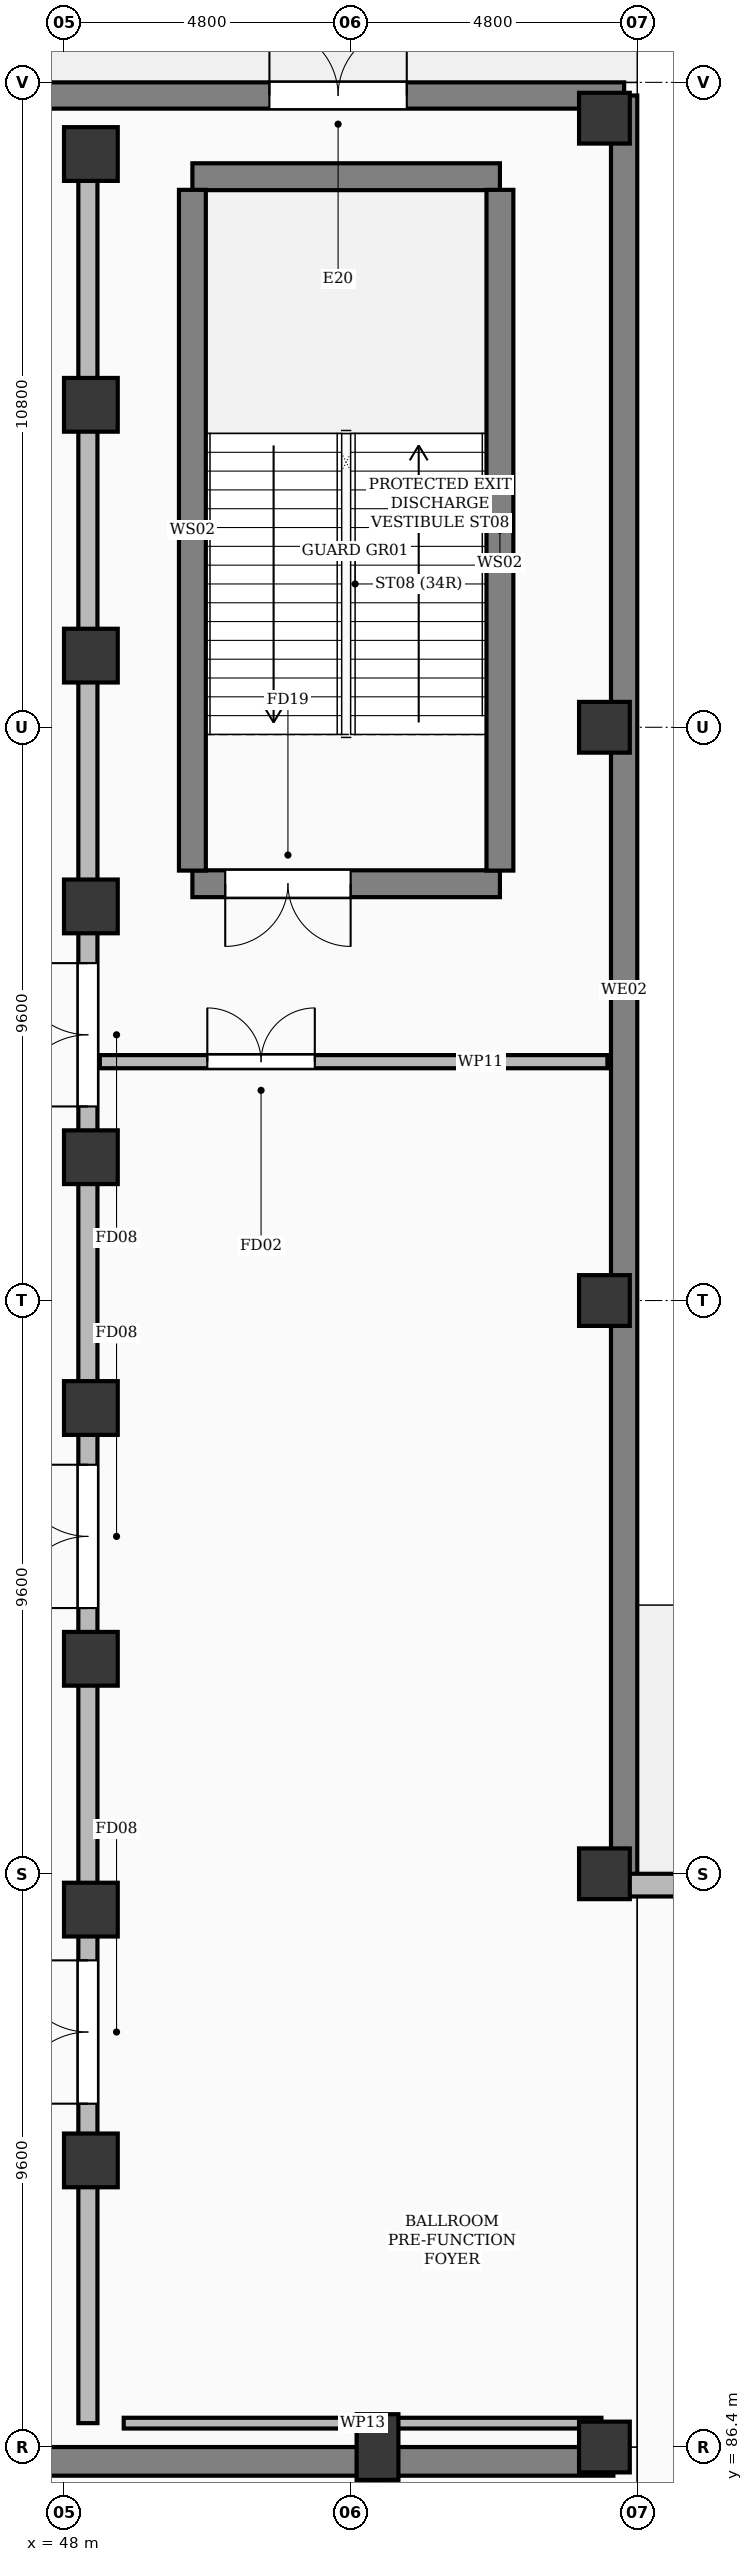
"""IFC4 building model, lengths in metres.
Left out: names, types, materials, properties, quantities, classifications, styles, units other than length and angle.
Written with IfcOpenShell. Run it as: python <this file> out.ifc"""

import sys

from ifc_helpers import new_model, si_unit, direction, frame, frame_2d, origin, origin_2d, place, context, subcontext, project, spatial, rectangle, extrude, element, fill, save


model = new_model("IFC4")
c1 = context("Model", 3, precision=1e-05, world=origin(), true_north=direction((0.0, 1.0)))
c2 = subcontext(c1, "Body", "Model", "MODEL_VIEW")
j1 = project(units=[si_unit("LENGTHUNIT", "METRE"), si_unit("PLANEANGLEUNIT", "RADIAN")], contexts=[c1])
p1 = place(None, origin())
s1 = spatial("IfcSite", under=j1, at=p1, CompositionType="ELEMENT")
p2 = place(p1, origin())
s2 = spatial("IfcBuilding", under=s1, at=p2, CompositionType="ELEMENT")
p3 = place(p2, origin())
s3 = spatial("IfcBuildingStorey", under=s2, at=p3, CompositionType="ELEMENT", Elevation=0.0)
p4 = place(p3, frame((57.05, 86.4, 0.0), z_axis=(0.0, 0.0, 1.0), x_axis=(1.0, 0.0, 0.0)))
e1 = element("IfcColumn", 1, at=p4, inside=s3, PredefinedType="COLUMN", context=c2, shape_type="SweptSolid", body=[
    extrude(rectangle(XDim=0.85, YDim=0.85, at=origin_2d()), origin(), (0.0, 0.0, 1.0), 6.0),
])
p5 = place(p3, frame((53.25, 86.4, 0.0), z_axis=(0.0, 0.0, 1.0), x_axis=(1.0, 0.0, 0.0)))
e2 = element("IfcColumn", 2, at=p5, inside=s3, PredefinedType="COLUMN", context=c2, shape_type="SweptSolid", body=[
    extrude(rectangle(XDim=0.7, YDim=1.1, at=origin_2d()), origin(), (0.0, 0.0, 1.0), 6.0),
])
for number, where, z_axis, x_axis in (
    (3, (48.45, 91.2, 0.0), (0.0, 0.0, 1.0), (1.0, 0.0, 0.0)),
    (4, (48.45, 95.4, 0.0), (0.0, 0.0, 1.0), (1.0, 0.0, 0.0)),
    (5, (48.45, 99.6, 0.0), (0.0, 0.0, 1.0), (1.0, 0.0, 0.0)),
    (6, (48.45, 103.8, 0.0), (0.0, 0.0, 1.0), (1.0, 0.0, 0.0)),
    (7, (48.45, 108.0, 0.0), (0.0, 0.0, 1.0), (1.0, 0.0, 0.0)),
    (8, (48.45, 112.2, 0.0), (0.0, 0.0, 1.0), (1.0, 0.0, 0.0)),
    (9, (48.45, 116.4, 0.0), (0.0, 0.0, 1.0), (1.0, 0.0, 0.0)),
    (10, (48.45, 120.6, 0.0), (0.0, 0.0, 1.0), (1.0, 0.0, 0.0)),
    (11, (48.45, 124.8, 0.0), (0.0, 0.0, 1.0), (1.0, 0.0, 0.0)),
):
    element("IfcColumn", number, at=place(p3, frame(where, z_axis=z_axis, x_axis=x_axis)), inside=s3, PredefinedType="COLUMN", context=c2, shape_type="SweptSolid", body=[
        extrude(rectangle(XDim=0.9, YDim=0.9, at=origin_2d()), origin(), (0.0, 0.0, 1.0), 6.0),
    ])
for number, where, z_axis, x_axis in (
    (12, (57.05, 96.0, 0.0), (0.0, 0.0, 1.0), (1.0, 0.0, 0.0)),
    (13, (57.05, 105.6, 0.0), (0.0, 0.0, 1.0), (1.0, 0.0, 0.0)),
    (14, (57.05, 115.2, 0.0), (0.0, 0.0, 1.0), (1.0, 0.0, 0.0)),
    (15, (57.05, 125.4, 0.0), (0.0, 0.0, 1.0), (1.0, 0.0, 0.0)),
):
    element("IfcColumn", number, at=place(p3, frame(where, z_axis=z_axis, x_axis=x_axis)), inside=s3, PredefinedType="COLUMN", context=c2, shape_type="SweptSolid", body=[
        extrude(rectangle(XDim=0.85, YDim=0.85, at=origin_2d()), origin(), (0.0, 0.0, 1.0), 6.0),
    ])
p6 = place(p3, frame((0.24, 125.78, 0.0), z_axis=(0.0, 0.0, 1.0), x_axis=(1.0, 0.0, 0.0)))
e16 = element("IfcWall", 16, at=p6, inside=s3, PredefinedType="SOLIDWALL", context=c2, shape_type="SweptSolid", body=[
    extrude(rectangle(XDim=57.14, YDim=0.44, at=frame_2d((28.57, 0.0))), origin(), (0.0, 0.0, 1.0), 6.0),
])
p7 = place(p6, frame((4.95, 0.0, 0.0)))
e17 = element("IfcOpeningElement", 17, at=p7, cuts=e16, PredefinedType="OPENING", context=c2, shape_type="SweptSolid", body=[
    extrude(rectangle(XDim=2.3, YDim=2.4, at=frame_2d((1.15, 1.2))), frame((0.0, 0.232, 0.0), z_axis=(0.0, -1.0, 0.0), x_axis=(1.0, 0.0, 0.0)), (0.0, 0.0, 1.0), 0.464),
])
p8 = place(p6, frame((8.0, 0.0, 0.0)))
e18 = element("IfcOpeningElement", 18, at=p8, cuts=e16, PredefinedType="OPENING", context=c2, shape_type="SweptSolid", body=[
    extrude(rectangle(XDim=2.3, YDim=2.4, at=frame_2d((1.15, 1.2))), frame((0.0, 0.232, 0.0), z_axis=(0.0, -1.0, 0.0), x_axis=(1.0, 0.0, 0.0)), (0.0, 0.0, 1.0), 0.464),
])
p9 = place(p6, frame((12.8, 0.0, 0.0)))
e19 = element("IfcOpeningElement", 19, at=p9, cuts=e16, PredefinedType="OPENING", context=c2, shape_type="SweptSolid", body=[
    extrude(rectangle(XDim=2.3, YDim=2.4, at=frame_2d((1.15, 1.2))), frame((0.0, 0.232, 0.0), z_axis=(0.0, -1.0, 0.0), x_axis=(1.0, 0.0, 0.0)), (0.0, 0.0, 1.0), 0.464),
])
p10 = place(p6, frame((17.6, 0.0, 0.0)))
e20 = element("IfcOpeningElement", 20, at=p10, cuts=e16, PredefinedType="OPENING", context=c2, shape_type="SweptSolid", body=[
    extrude(rectangle(XDim=2.3, YDim=2.4, at=frame_2d((1.15, 1.2))), frame((0.0, 0.232, 0.0), z_axis=(0.0, -1.0, 0.0), x_axis=(1.0, 0.0, 0.0)), (0.0, 0.0, 1.0), 0.464),
])
p11 = place(p6, frame((22.4, 0.0, 0.0)))
e21 = element("IfcOpeningElement", 21, at=p11, cuts=e16, PredefinedType="OPENING", context=c2, shape_type="SweptSolid", body=[
    extrude(rectangle(XDim=2.3, YDim=2.4, at=frame_2d((1.15, 1.2))), frame((0.0, 0.232, 0.0), z_axis=(0.0, -1.0, 0.0), x_axis=(1.0, 0.0, 0.0)), (0.0, 0.0, 1.0), 0.464),
])
p12 = place(p6, frame((27.2, 0.0, 0.0)))
e22 = element("IfcOpeningElement", 22, at=p12, cuts=e16, PredefinedType="OPENING", context=c2, shape_type="SweptSolid", body=[
    extrude(rectangle(XDim=2.3, YDim=2.4, at=frame_2d((1.15, 1.2))), frame((0.0, 0.232, 0.0), z_axis=(0.0, -1.0, 0.0), x_axis=(1.0, 0.0, 0.0)), (0.0, 0.0, 1.0), 0.464),
])
p13 = place(p6, frame((32.0, 0.0, 0.0)))
e23 = element("IfcOpeningElement", 23, at=p13, cuts=e16, PredefinedType="OPENING", context=c2, shape_type="SweptSolid", body=[
    extrude(rectangle(XDim=2.3, YDim=2.4, at=frame_2d((1.15, 1.2))), frame((0.0, 0.232, 0.0), z_axis=(0.0, -1.0, 0.0), x_axis=(1.0, 0.0, 0.0)), (0.0, 0.0, 1.0), 0.464),
])
p14 = place(p6, frame((36.8, 0.0, 0.0)))
e24 = element("IfcOpeningElement", 24, at=p14, cuts=e16, PredefinedType="OPENING", context=c2, shape_type="SweptSolid", body=[
    extrude(rectangle(XDim=2.3, YDim=2.4, at=frame_2d((1.15, 1.2))), frame((0.0, 0.232, 0.0), z_axis=(0.0, -1.0, 0.0), x_axis=(1.0, 0.0, 0.0)), (0.0, 0.0, 1.0), 0.464),
])
p15 = place(p6, frame((51.2, 0.0, 0.0)))
e25 = element("IfcOpeningElement", 25, at=p15, cuts=e16, PredefinedType="OPENING", context=c2, shape_type="SweptSolid", body=[
    extrude(rectangle(XDim=2.3, YDim=2.4, at=frame_2d((1.15, 1.2))), frame((0.0, 0.232, 0.0), z_axis=(0.0, -1.0, 0.0), x_axis=(1.0, 0.0, 0.0)), (0.0, 0.0, 1.0), 0.464),
])
p16 = place(p6, frame((43.0, 0.0, 0.0)))
e26 = element("IfcOpeningElement", 26, at=p16, cuts=e16, PredefinedType="OPENING", context=c2, shape_type="SweptSolid", body=[
    extrude(rectangle(XDim=4.2, YDim=4.1, at=frame_2d((2.1, 2.05))), frame((0.0, 0.232, 0.0), z_axis=(0.0, -1.0, 0.0), x_axis=(1.0, 0.0, 0.0)), (0.0, 0.0, 1.0), 0.464),
])
p17 = place(p3, frame((57.38, 125.78, 0.0), z_axis=(0.0, 0.0, 1.0), x_axis=(0.0, -1.0, 0.0)))
e27 = element("IfcWall", 27, at=p17, inside=s3, PredefinedType="SOLIDWALL", context=c2, shape_type="SweptSolid", body=[
    extrude(rectangle(XDim=29.97, YDim=0.44, at=frame_2d((14.985, 0.0))), origin(), (0.0, 0.0, 1.0), 6.0),
])
p18 = place(p3, frame((57.4, 95.81, 0.0), z_axis=(0.0, 0.0, 1.0), x_axis=(1.0, 0.0, 0.0)))
e28 = element("IfcWall", 28, at=p18, inside=s3, PredefinedType="SOLIDWALL", context=c2, shape_type="SweptSolid", body=[
    extrude(rectangle(XDim=9.8, YDim=0.38, at=frame_2d((4.9, 0.0))), origin(), (0.0, 0.0, 1.0), 4.692),
])
p19 = place(p18, frame((1.4, 0.0, 0.0)))
e29 = element("IfcOpeningElement", 29, at=p19, cuts=e28, PredefinedType="OPENING", context=c2, shape_type="SweptSolid", body=[
    extrude(rectangle(XDim=6.0, YDim=3.8, at=frame_2d((3.0, 1.9))), frame((0.0, 0.202, 0.0), z_axis=(0.0, -1.0, 0.0), x_axis=(1.0, 0.0, 0.0)), (0.0, 0.0, 1.0), 0.404),
])
p20 = place(p3, frame((0.5, 86.16, 0.0), z_axis=(0.0, 0.0, 1.0), x_axis=(1.0, 0.0, 0.0)))
e30 = element("IfcWall", 30, at=p20, inside=s3, PredefinedType="SOLIDWALL", context=c2, shape_type="SweptSolid", body=[
    extrude(rectangle(XDim=56.7, YDim=0.48, at=frame_2d((28.35, 0.0))), origin(), (0.0, 0.0, 1.0), 6.0),
])
p21 = place(p3, frame((50.15, 112.58, 0.0), z_axis=(0.0, 0.0, 1.0), x_axis=(1.0, 0.0, 0.0)))
e31 = element("IfcWall", 31, at=p21, inside=s3, PredefinedType="SHEAR", context=c2, shape_type="SweptSolid", body=[
    extrude(rectangle(XDim=5.15, YDim=0.45, at=frame_2d((2.575, 0.0))), origin(), (0.0, 0.0, 1.0), 5.7),
])
p22 = place(p21, frame((0.55, 0.0, 0.0)))
e32 = element("IfcOpeningElement", 32, at=p22, cuts=e31, PredefinedType="OPENING", context=c2, shape_type="SweptSolid", body=[
    extrude(rectangle(XDim=2.1, YDim=2.2, at=frame_2d((1.05, 1.1))), frame((0.0, 0.237, 0.0), z_axis=(0.0, -1.0, 0.0), x_axis=(1.0, 0.0, 0.0)), (0.0, 0.0, 1.0), 0.474),
])
p23 = place(p3, frame((50.15, 124.42, 0.0), z_axis=(0.0, 0.0, 1.0), x_axis=(1.0, 0.0, 0.0)))
e33 = element("IfcWall", 33, at=p23, inside=s3, PredefinedType="SHEAR", context=c2, shape_type="SweptSolid", body=[
    extrude(rectangle(XDim=5.15, YDim=0.45, at=frame_2d((2.575, 0.0))), origin(), (0.0, 0.0, 1.0), 5.7),
])
for number, where, z_axis, x_axis in (
    (34, (50.15, 112.8, 0.0), (0.0, 0.0, 1.0), (0.0, 1.0, 0.0)),
    (35, (55.3, 112.8, 0.0), (0.0, 0.0, 1.0), (0.0, 1.0, 0.0)),
):
    element("IfcWall", number, at=place(p3, frame(where, z_axis=z_axis, x_axis=x_axis)), inside=s3, PredefinedType="SHEAR", context=c2, shape_type="SweptSolid", body=[
        extrude(rectangle(XDim=11.4, YDim=0.45, at=frame_2d((5.7, 0.0))), origin(), (0.0, 0.0, 1.0), 5.7),
    ])
p24 = place(p3, frame((48.4, 86.8, 0.0), z_axis=(0.0, 0.0, 1.0), x_axis=(0.0, 1.0, 0.0)))
e36 = element("IfcWall", 36, at=p24, inside=s3, PredefinedType="SOLIDWALL", context=c2, shape_type="SweptSolid", body=[
    extrude(rectangle(XDim=37.8, YDim=0.32, at=frame_2d((18.9, 0.0))), origin(), (0.0, 0.0, 1.0), 4.692),
])
p25 = place(p24, frame((5.35, 0.0, 0.0)))
e37 = element("IfcOpeningElement", 37, at=p25, cuts=e36, PredefinedType="OPENING", context=c2, shape_type="SweptSolid", body=[
    extrude(rectangle(XDim=2.4, YDim=2.5, at=frame_2d((1.2, 1.25))), frame((0.0, 0.172, 0.0), z_axis=(0.0, -1.0, 0.0), x_axis=(1.0, 0.0, 0.0)), (0.0, 0.0, 1.0), 0.344),
])
p26 = place(p24, frame((13.65, 0.0, 0.0)))
e38 = element("IfcOpeningElement", 38, at=p26, cuts=e36, PredefinedType="OPENING", context=c2, shape_type="SweptSolid", body=[
    extrude(rectangle(XDim=2.4, YDim=2.5, at=frame_2d((1.2, 1.25))), frame((0.0, 0.172, 0.0), z_axis=(0.0, -1.0, 0.0), x_axis=(1.0, 0.0, 0.0)), (0.0, 0.0, 1.0), 0.344),
])
p27 = place(p24, frame((22.05, 0.0, 0.0)))
e39 = element("IfcOpeningElement", 39, at=p27, cuts=e36, PredefinedType="OPENING", context=c2, shape_type="SweptSolid", body=[
    extrude(rectangle(XDim=2.4, YDim=2.5, at=frame_2d((1.2, 1.25))), frame((0.0, 0.172, 0.0), z_axis=(0.0, -1.0, 0.0), x_axis=(1.0, 0.0, 0.0)), (0.0, 0.0, 1.0), 0.344),
])
p28 = place(p3, frame((49.0, 86.8, 0.0), z_axis=(0.0, 0.0, 1.0), x_axis=(1.0, 0.0, 0.0)))
e40 = element("IfcWall", 40, at=p28, inside=s3, PredefinedType="PARTITIONING", context=c2, shape_type="SweptSolid", body=[
    extrude(rectangle(XDim=8.0, YDim=0.18, at=frame_2d((4.0, 0.0))), origin(), (0.0, 0.0, 1.0), 4.592),
])
p29 = place(p3, frame((48.6, 109.6, 0.0), z_axis=(0.0, 0.0, 1.0), x_axis=(1.0, 0.0, 0.0)))
e41 = element("IfcWall", 41, at=p29, inside=s3, PredefinedType="PARTITIONING", context=c2, shape_type="SweptSolid", body=[
    extrude(rectangle(XDim=8.5, YDim=0.22, at=frame_2d((4.25, 0.0))), origin(), (0.0, 0.0, 1.0), 4.692),
])
p30 = place(p29, frame((1.8, 0.0, 0.0)))
e42 = element("IfcOpeningElement", 42, at=p30, cuts=e41, PredefinedType="OPENING", context=c2, shape_type="SweptSolid", body=[
    extrude(rectangle(XDim=1.8, YDim=2.2, at=frame_2d((0.9, 1.1))), frame((0.0, 0.122, 0.0), z_axis=(0.0, -1.0, 0.0), x_axis=(1.0, 0.0, 0.0)), (0.0, 0.0, 1.0), 0.244),
])
p31 = place(p15, origin())
e43 = element("IfcDoor", 43, at=p31, inside=s3, OperationType="DOUBLE_DOOR_SINGLE_SWING", PredefinedType="DOOR", context=c2, shape_type="SweptSolid", body=[
    extrude(rectangle(XDim=2.3, YDim=2.4, at=frame_2d((1.15, 1.2))), frame((0.0, 0.025, 0.0), z_axis=(0.0, -1.0, 0.0), x_axis=(1.0, 0.0, 0.0)), (0.0, 0.0, 1.0), 0.05),
])
fill(e25, e43)
p32 = place(p22, frame((2.1, 0.0, 0.0), z_axis=(0.0, 0.0, 1.0), x_axis=(-1.0, 0.0, 0.0)))
e44 = element("IfcDoor", 44, at=p32, inside=s3, OperationType="DOUBLE_DOOR_SINGLE_SWING", PredefinedType="DOOR", context=c2, shape_type="SweptSolid", body=[
    extrude(rectangle(XDim=2.1, YDim=2.2, at=frame_2d((1.05, 1.1))), frame((0.0, 0.025, 0.0), z_axis=(0.0, -1.0, 0.0), x_axis=(1.0, 0.0, 0.0)), (0.0, 0.0, 1.0), 0.05),
])
fill(e32, e44)
p33 = place(p25, origin())
e45 = element("IfcDoor", 45, at=p33, inside=s3, OperationType="DOUBLE_DOOR_SINGLE_SWING", PredefinedType="DOOR", context=c2, shape_type="SweptSolid", body=[
    extrude(rectangle(XDim=2.4, YDim=2.5, at=frame_2d((1.2, 1.25))), frame((0.0, 0.025, 0.0), z_axis=(0.0, -1.0, 0.0), x_axis=(1.0, 0.0, 0.0)), (0.0, 0.0, 1.0), 0.05),
])
fill(e37, e45)
p34 = place(p26, origin())
e46 = element("IfcDoor", 46, at=p34, inside=s3, OperationType="DOUBLE_DOOR_SINGLE_SWING", PredefinedType="DOOR", context=c2, shape_type="SweptSolid", body=[
    extrude(rectangle(XDim=2.4, YDim=2.5, at=frame_2d((1.2, 1.25))), frame((0.0, 0.025, 0.0), z_axis=(0.0, -1.0, 0.0), x_axis=(1.0, 0.0, 0.0)), (0.0, 0.0, 1.0), 0.05),
])
fill(e38, e46)
p35 = place(p27, origin())
e47 = element("IfcDoor", 47, at=p35, inside=s3, OperationType="DOUBLE_DOOR_SINGLE_SWING", PredefinedType="DOOR", context=c2, shape_type="SweptSolid", body=[
    extrude(rectangle(XDim=2.4, YDim=2.5, at=frame_2d((1.2, 1.25))), frame((0.0, 0.025, 0.0), z_axis=(0.0, -1.0, 0.0), x_axis=(1.0, 0.0, 0.0)), (0.0, 0.0, 1.0), 0.05),
])
fill(e39, e47)
p36 = place(p30, origin())
e48 = element("IfcDoor", 48, at=p36, inside=s3, OperationType="DOUBLE_DOOR_SINGLE_SWING", PredefinedType="DOOR", context=c2, shape_type="SweptSolid", body=[
    extrude(rectangle(XDim=1.8, YDim=2.2, at=frame_2d((0.9, 1.1))), frame((0.0, 0.025, 0.0), z_axis=(0.0, -1.0, 0.0), x_axis=(1.0, 0.0, 0.0)), (0.0, 0.0, 1.0), 0.05),
])
fill(e42, e48)
save(model, sys.argv[1])
